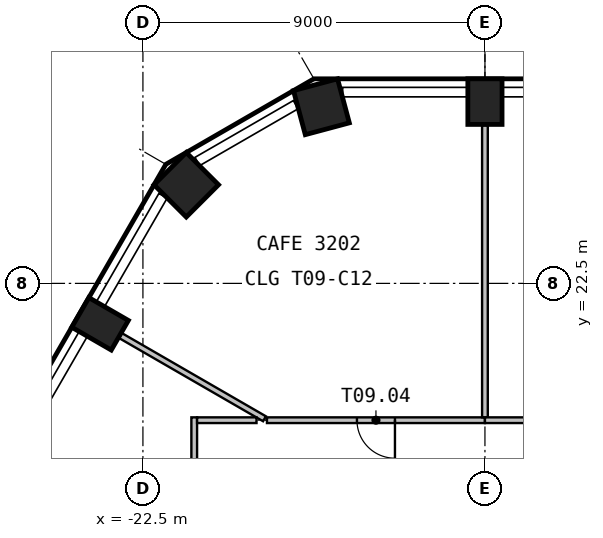
"""IFC4 building model, lengths in metres.
Left out: names, types, materials, properties, quantities, classifications, styles, units other than length and angle.
Written with IfcOpenShell. Run it as: python <this file> out.ifc"""

import sys

from ifc_helpers import new_model, si_unit, direction, frame, frame_2d, origin, origin_2d, place, context, subcontext, project, spatial, rectangle, extrude, element, fill, save


model = new_model("IFC4")
c1 = context("Model", 3, precision=1e-05, world=origin(), true_north=direction((0.0, 1.0)))
c2 = subcontext(c1, "Body", "Model", "MODEL_VIEW")
j1 = project(units=[si_unit("LENGTHUNIT", "METRE"), si_unit("PLANEANGLEUNIT", "RADIAN")], contexts=[c1])
p1 = place(None, origin())
s1 = spatial("IfcSite", under=j1, at=p1, CompositionType="ELEMENT")
p2 = place(p1, origin())
s2 = spatial("IfcBuilding", under=s1, at=p2, CompositionType="ELEMENT")
p3 = place(p2, frame((0.0, 0.0, 132.6)))
s3 = spatial("IfcBuildingStorey", under=s2, at=p3, CompositionType="ELEMENT", Elevation=132.6)
p4 = place(p3, frame((-13.5, 27.283, 0.0), z_axis=(0.0, 0.0, 1.0), x_axis=(-1.0, 0.0, 0.0)))
e1 = element("IfcColumn", 1, at=p4, inside=s3, PredefinedType="COLUMN", context=c2, shape_type="SweptSolid", body=[
    extrude(rectangle(XDim=0.9, YDim=1.2, at=origin_2d()), origin(), (0.0, 0.0, 1.0), 3.575),
])
for number, where, z_axis, x_axis in (
    (2, (-17.803, 27.148, 0.0), (0.0, 0.0, 1.0), (-0.966, -0.259, 0.0)),
    (3, (-21.359, 25.095, 0.0), (0.0, 0.0, 1.0), (-0.707, -0.707, 0.0)),
):
    element("IfcColumn", number, at=place(p3, frame(where, z_axis=z_axis, x_axis=x_axis)), inside=s3, PredefinedType="COLUMN", context=c2, shape_type="SweptSolid", body=[
        extrude(rectangle(XDim=1.2, YDim=1.2, at=origin_2d()), origin(), (0.0, 0.0, 1.0), 3.575),
    ])
p5 = place(p3, frame((-23.627, 21.436, 0.0), z_axis=(0.0, 0.0, 1.0), x_axis=(-0.5, -0.866025403784, 0.0)))
e4 = element("IfcColumn", 4, at=p5, inside=s3, PredefinedType="COLUMN", context=c2, shape_type="SweptSolid", body=[
    extrude(rectangle(XDim=0.9, YDim=1.2, at=origin_2d()), origin(), (0.0, 0.0, 1.0), 3.575),
])
p6 = place(p3, frame((-23.09, 21.126, 0.0), z_axis=(0.0, 0.0, 1.0), x_axis=(0.865968165673, -0.500099126214, 0.0)))
e5 = element("IfcWall", 5, at=p6, inside=s3, PredefinedType="PARTITIONING", context=c2, shape_type="SweptSolid", body=[
    extrude(rectangle(XDim=4.376, YDim=0.15, at=frame_2d((2.188, 0.0))), origin(), (0.0, 0.0, 1.0), 3.575),
])
p7 = place(p3, frame((-21.15, 18.975, 0.0), z_axis=(0.0, 0.0, 1.0), x_axis=(0.0, -1.0, 0.0)))
e6 = element("IfcWall", 6, at=p7, inside=s3, PredefinedType="PARTITIONING", context=c2, shape_type="SweptSolid", body=[
    extrude(rectangle(XDim=18.196, YDim=0.15, at=frame_2d((9.098, 0.0))), origin(), (0.0, 0.0, 1.0), 3.575),
])
p8 = place(p7, frame((8.598, 0.0, 0.0)))
e7 = element("IfcOpeningElement", 7, at=p8, cuts=e6, PredefinedType="OPENING", context=c2, shape_type="SweptSolid", body=[
    extrude(rectangle(XDim=1.0, YDim=2.1, at=frame_2d((0.5, 1.05))), frame((0.0, 0.085, 0.0), z_axis=(0.0, -1.0, 0.0), x_axis=(1.0, 0.0, 0.0)), (0.0, 0.0, 1.0), 0.17),
])
p9 = place(p3, frame((-19.511, 18.9, 0.0), z_axis=(0.0, 0.0, 1.0), x_axis=(-1.0, 0.0, 0.0)))
e8 = element("IfcWall", 8, at=p9, inside=s3, PredefinedType="PARTITIONING", context=c2, shape_type="SweptSolid", body=[
    extrude(rectangle(XDim=1.564, YDim=0.15, at=frame_2d((0.782, 0.0))), origin(), (0.0, 0.0, 1.0), 3.575),
])
p10 = place(p3, frame((-13.5, 18.9, 0.0), z_axis=(0.0, 0.0, 1.0), x_axis=(-1.0, 0.0, 0.0)))
e9 = element("IfcWall", 9, at=p10, inside=s3, PredefinedType="PARTITIONING", context=c2, shape_type="SweptSolid", body=[
    extrude(rectangle(XDim=5.736, YDim=0.15, at=frame_2d((2.868, 0.0))), origin(), (0.0, 0.0, 1.0), 3.575),
])
p11 = place(p10, frame((2.368, 0.0, 0.0)))
e10 = element("IfcOpeningElement", 10, at=p11, cuts=e9, PredefinedType="OPENING", context=c2, shape_type="SweptSolid", body=[
    extrude(rectangle(XDim=1.0, YDim=2.1, at=frame_2d((0.5, 1.05))), frame((0.0, 0.085, 0.0), z_axis=(0.0, -1.0, 0.0), x_axis=(1.0, 0.0, 0.0)), (0.0, 0.0, 1.0), 0.17),
])
p12 = place(p3, frame((-13.5, 26.663, 0.0), z_axis=(0.0, 0.0, 1.0), x_axis=(0.0, -1.0, 0.0)))
e11 = element("IfcWall", 11, at=p12, inside=s3, PredefinedType="PARTITIONING", context=c2, shape_type="SweptSolid", body=[
    extrude(rectangle(XDim=7.688, YDim=0.15, at=frame_2d((3.844, 0.0))), origin(), (0.0, 0.0, 1.0), 3.575),
])
p13 = place(p3, frame((4.5, 18.9, 0.0), z_axis=(0.0, 0.0, 1.0), x_axis=(-1.0, 0.0, 0.0)))
e12 = element("IfcWall", 12, at=p13, inside=s3, PredefinedType="PARTITIONING", context=c2, shape_type="SweptSolid", body=[
    extrude(rectangle(XDim=18.0, YDim=0.15, at=frame_2d((9.0, 0.0))), origin(), (0.0, 0.0, 1.0), 3.575),
])
p14 = place(p13, frame((8.5, 0.0, 0.0)))
e13 = element("IfcOpeningElement", 13, at=p14, cuts=e12, PredefinedType="OPENING", context=c2, shape_type="SweptSolid", body=[
    extrude(rectangle(XDim=1.0, YDim=2.1, at=frame_2d((0.5, 1.05))), frame((0.0, 0.085, 0.0), z_axis=(0.0, -1.0, 0.0), x_axis=(1.0, 0.0, 0.0)), (0.0, 0.0, 1.0), 0.17),
])
p15 = place(p11, origin())
e14 = element("IfcDoor", 14, at=p15, inside=s3, OperationType="SINGLE_SWING_RIGHT", PredefinedType="DOOR", context=c2, shape_type="SweptSolid", body=[
    extrude(rectangle(XDim=1.0, YDim=2.1, at=frame_2d((0.5, 1.05))), frame((0.0, 0.025, 0.0), z_axis=(0.0, -1.0, 0.0), x_axis=(1.0, 0.0, 0.0)), (0.0, 0.0, 1.0), 0.05),
])
fill(e10, e14)
save(model, sys.argv[1])
